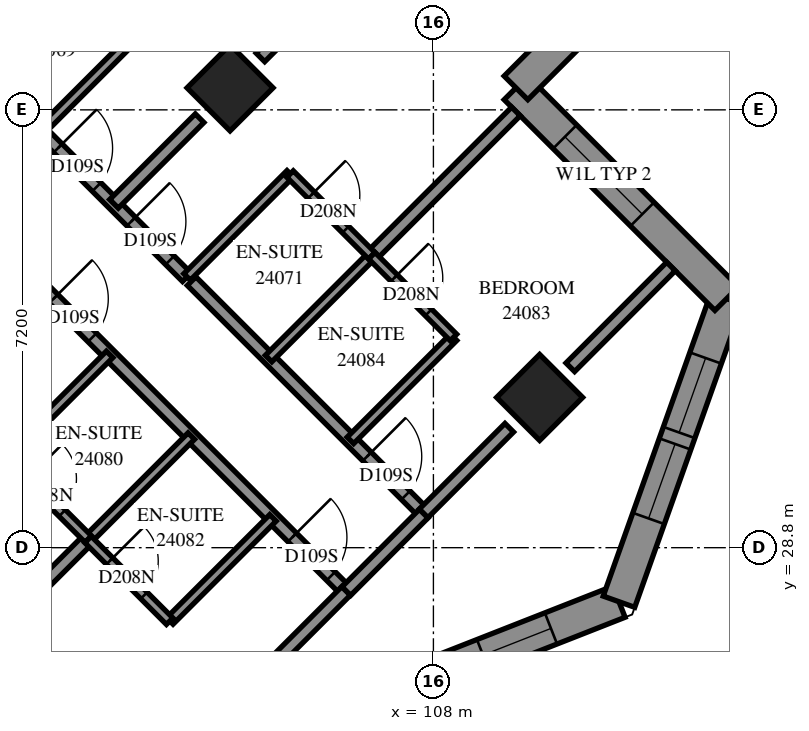
"""IFC4 building model, lengths in metres.
Left out: names, types, materials, properties, quantities, classifications, styles, units other than length and angle.
Written with IfcOpenShell. Run it as: python <this file> out.ifc"""

import sys

from ifc_helpers import new_model, si_unit, direction, frame, frame_2d, origin, origin_2d, place, context, subcontext, project, spatial, polyline, rectangle, outline, extrude, element, fill, save


model = new_model("IFC4")
c1 = context("Model", 3, precision=1e-05, world=origin(), true_north=direction((0.0, 1.0)))
c2 = subcontext(c1, "Body", "Model", "MODEL_VIEW")
j1 = project(units=[si_unit("LENGTHUNIT", "METRE"), si_unit("PLANEANGLEUNIT", "RADIAN")], contexts=[c1])
p1 = place(None, origin())
s1 = spatial("IfcSite", under=j1, at=p1, CompositionType="ELEMENT")
p2 = place(p1, origin())
s2 = spatial("IfcBuilding", under=s1, at=p2, CompositionType="ELEMENT")
p3 = place(p2, frame((0.0, 0.0, 91.4)))
s3 = spatial("IfcBuildingStorey", under=s2, at=p3, CompositionType="ELEMENT", Elevation=91.4)
for number, where, z_axis, x_axis in (
    (1, (104.656, 36.362, 0.0), (0.0, 0.0, 1.0), (0.707, -0.707, 0.0)),
    (2, (109.747, 31.271, 0.0), (0.0, 0.0, 1.0), (0.707, -0.707, 0.0)),
):
    element("IfcColumn", number, at=place(p3, frame(where, z_axis=z_axis, x_axis=x_axis)), inside=s3, PredefinedType="COLUMN", context=c2, shape_type="SweptSolid", body=[
        extrude(rectangle(XDim=1.0, YDim=1.0, at=origin_2d()), origin(), (0.0, 0.0, 1.0), 3.1),
    ])
p4 = place(p3, frame((105.932, 25.9, 0.0), z_axis=(0.0, 0.0, 1.0), x_axis=(0.9307322689, 0.3657013038, 0.0)))
e3 = element("IfcWall", 3, at=p4, inside=s3, PredefinedType="SOLIDWALL", context=c2, shape_type="SweptSolid", body=[
    extrude(outline(polyline([(0.12, -0.275), (5.626, -0.275), (5.376, 0.275), (-0.12, 0.275), (0.12, -0.275)])), origin(), (0.0, 0.0, 1.0), 3.1),
])
p5 = place(p4, frame((0.611, 0.0, 0.5)))
e4 = element("IfcOpeningElement", 4, at=p5, cuts=e3, PredefinedType="OPENING", context=c2, shape_type="SweptSolid", body=[
    extrude(rectangle(XDim=1.2, YDim=2.45, at=frame_2d((0.6, 1.225))), frame((0.0, 0.285, 0.0), z_axis=(0.0, -1.0, 0.0), x_axis=(1.0, 0.0, 0.0)), (0.0, 0.0, 1.0), 0.57),
])
p6 = place(p4, frame((3.099, 0.0, 0.5)))
e5 = element("IfcOpeningElement", 5, at=p6, cuts=e3, PredefinedType="OPENING", context=c2, shape_type="SweptSolid", body=[
    extrude(rectangle(XDim=1.2, YDim=2.45, at=frame_2d((0.6, 1.225))), frame((0.0, 0.285, 0.0), z_axis=(0.0, -1.0, 0.0), x_axis=(1.0, 0.0, 0.0)), (0.0, 0.0, 1.0), 0.57),
])
p7 = place(p3, frame((111.052, 27.912, 0.0), z_axis=(0.0, 0.0, 1.0), x_axis=(0.334975732, 0.9422267556, 0.0)))
e6 = element("IfcWall", 6, at=p7, inside=s3, PredefinedType="SOLIDWALL", context=c2, shape_type="SweptSolid", body=[
    extrude(outline(polyline([(-0.125, -0.275), (5.464, -0.275), (5.117, 0.275), (0.125, 0.275), (-0.125, -0.275)])), origin(), (0.0, 0.0, 1.0), 3.1),
])
p8 = place(p7, frame((1.453, 0.0, 0.5)))
e7 = element("IfcOpeningElement", 7, at=p8, cuts=e6, PredefinedType="OPENING", context=c2, shape_type="SweptSolid", body=[
    extrude(rectangle(XDim=1.3, YDim=2.45, at=frame_2d((0.65, 1.225))), frame((0.0, 0.285, 0.0), z_axis=(0.0, -1.0, 0.0), x_axis=(1.0, 0.0, 0.0)), (0.0, 0.0, 1.0), 0.57),
])
p9 = place(p7, frame((2.953, 0.0, 0.5)))
e8 = element("IfcOpeningElement", 8, at=p9, cuts=e6, PredefinedType="OPENING", context=c2, shape_type="SweptSolid", body=[
    extrude(rectangle(XDim=1.3, YDim=2.45, at=frame_2d((0.65, 1.225))), frame((0.0, 0.285, 0.0), z_axis=(0.0, -1.0, 0.0), x_axis=(1.0, 0.0, 0.0)), (0.0, 0.0, 1.0), 0.57),
])
p10 = place(p3, frame((112.824, 32.896, 0.0), z_axis=(0.0, 0.0, 1.0), x_axis=(-0.7071067812, 0.7071067812, 0.0)))
e9 = element("IfcWall", 9, at=p10, inside=s3, PredefinedType="SOLIDWALL", context=c2, shape_type="SweptSolid", body=[
    extrude(outline(polyline([(-0.174, -0.275), (4.626, -0.275), (5.176, 0.275), (0.174, 0.275), (-0.174, -0.275)])), origin(), (0.0, 0.0, 1.0), 3.1),
])
p11 = place(p10, frame((1.964, 0.0, 0.6)))
e10 = element("IfcOpeningElement", 10, at=p11, cuts=e9, PredefinedType="OPENING", context=c2, shape_type="SweptSolid", body=[
    extrude(rectangle(XDim=1.8, YDim=1.9, at=frame_2d((0.9, 0.95))), frame((0.0, 0.285, 0.0), z_axis=(0.0, -1.0, 0.0), x_axis=(1.0, 0.0, 0.0)), (0.0, 0.0, 1.0), 0.57),
])
p12 = place(p3, frame((109.358, 36.362, 0.0), z_axis=(0.0, 0.0, 1.0), x_axis=(0.7071067812, 0.7071067812, 0.0)))
e11 = element("IfcWall", 11, at=p12, inside=s3, PredefinedType="SOLIDWALL", context=c2, shape_type="SweptSolid", body=[
    extrude(outline(polyline([(0.275, -0.275), (6.066, -0.275), (5.333, 0.275), (-0.275, 0.275), (0.275, -0.275)])), origin(), (0.0, 0.0, 1.0), 3.1),
])
p13 = place(p12, frame((1.137, 0.0, 0.6)))
e12 = element("IfcOpeningElement", 12, at=p13, cuts=e11, PredefinedType="OPENING", context=c2, shape_type="SweptSolid", body=[
    extrude(rectangle(XDim=1.8, YDim=1.9, at=frame_2d((0.9, 0.95))), frame((0.0, 0.285, 0.0), z_axis=(0.0, -1.0, 0.0), x_axis=(1.0, 0.0, 0.0)), (0.0, 0.0, 1.0), 0.57),
])
p14 = place(p3, frame((93.339, 41.309, 0.0), z_axis=(0.0, 0.0, 1.0), x_axis=(0.7071067812, -0.7071067812, 0.0)))
e13 = element("IfcWall", 13, at=p14, inside=s3, PredefinedType="PARTITIONING", context=c2, shape_type="SweptSolid", body=[
    extrude(rectangle(XDim=18.702, YDim=0.2, at=frame_2d((9.351, 0.0))), origin(), (0.0, 0.0, 1.0), 3.1),
])
p15 = place(p14, frame((3.05, 0.0, 0.0)))
e14 = element("IfcOpeningElement", 14, at=p15, cuts=e13, PredefinedType="OPENING", context=c2, shape_type="SweptSolid", body=[
    extrude(rectangle(XDim=0.9, YDim=2.1, at=frame_2d((0.45, 1.05))), frame((0.0, 0.11, 0.0), z_axis=(0.0, -1.0, 0.0), x_axis=(1.0, 0.0, 0.0)), (0.0, 0.0, 1.0), 0.22),
])
p16 = place(p14, frame((4.7, 0.0, 0.0)))
e15 = element("IfcOpeningElement", 15, at=p16, cuts=e13, PredefinedType="OPENING", context=c2, shape_type="SweptSolid", body=[
    extrude(rectangle(XDim=0.9, YDim=2.1, at=frame_2d((0.45, 1.05))), frame((0.0, 0.11, 0.0), z_axis=(0.0, -1.0, 0.0), x_axis=(1.0, 0.0, 0.0)), (0.0, 0.0, 1.0), 0.22),
])
p17 = place(p14, frame((10.149, 0.0, 0.0)))
e16 = element("IfcOpeningElement", 16, at=p17, cuts=e13, PredefinedType="OPENING", context=c2, shape_type="SweptSolid", body=[
    extrude(rectangle(XDim=0.9, YDim=2.1, at=frame_2d((0.45, 1.05))), frame((0.0, 0.11, 0.0), z_axis=(0.0, -1.0, 0.0), x_axis=(1.0, 0.0, 0.0)), (0.0, 0.0, 1.0), 0.22),
])
p18 = place(p14, frame((11.9, 0.0, 0.0)))
e17 = element("IfcOpeningElement", 17, at=p18, cuts=e13, PredefinedType="OPENING", context=c2, shape_type="SweptSolid", body=[
    extrude(rectangle(XDim=0.9, YDim=2.1, at=frame_2d((0.45, 1.05))), frame((0.0, 0.11, 0.0), z_axis=(0.0, -1.0, 0.0), x_axis=(1.0, 0.0, 0.0)), (0.0, 0.0, 1.0), 0.22),
])
p19 = place(p14, frame((17.45, 0.0, 0.0)))
e18 = element("IfcOpeningElement", 18, at=p19, cuts=e13, PredefinedType="OPENING", context=c2, shape_type="SweptSolid", body=[
    extrude(rectangle(XDim=0.9, YDim=2.1, at=frame_2d((0.45, 1.05))), frame((0.0, 0.11, 0.0), z_axis=(0.0, -1.0, 0.0), x_axis=(1.0, 0.0, 0.0)), (0.0, 0.0, 1.0), 0.22),
])
p20 = place(p3, frame((96.501, 23.117, 0.0), z_axis=(0.0, 0.0, 1.0), x_axis=(0.7071128537, 0.7071007086, 0.0)))
e19 = element("IfcWall", 19, at=p20, inside=s3, PredefinedType="PARTITIONING", context=c2, shape_type="SweptSolid", body=[
    extrude(rectangle(XDim=8.234, YDim=0.2, at=frame_2d((4.117, 0.0))), origin(), (0.0, 0.0, 1.0), 3.1),
])
p21 = place(p3, frame((105.155, 36.863, 0.0), z_axis=(0.0, 0.0, 1.0), x_axis=(0.7071067812, 0.7071067812, 0.0)))
e20 = element("IfcWall", 20, at=p21, inside=s3, PredefinedType="PARTITIONING", context=c2, shape_type="SweptSolid", body=[
    extrude(rectangle(XDim=5.787, YDim=0.2, at=frame_2d((2.893, 0.0))), origin(), (0.0, 0.0, 1.0), 3.1),
])
p22 = place(p3, frame((104.023, 33.184, 0.0), z_axis=(0.0, 0.0, 1.0), x_axis=(0.7071067812, -0.7071067812, 0.0)))
e21 = element("IfcWall", 21, at=p22, inside=s3, PredefinedType="PARTITIONING", context=c2, shape_type="SweptSolid", body=[
    extrude(rectangle(XDim=5.399, YDim=0.2, at=frame_2d((2.7, 0.0))), origin(), (0.0, 0.0, 1.0), 3.1),
])
p23 = place(p22, frame((4.08, 0.0, 0.0)))
e22 = element("IfcOpeningElement", 22, at=p23, cuts=e21, PredefinedType="OPENING", context=c2, shape_type="SweptSolid", body=[
    extrude(rectangle(XDim=0.9, YDim=2.1, at=frame_2d((0.45, 1.05))), frame((0.0, 0.11, 0.0), z_axis=(0.0, -1.0, 0.0), x_axis=(1.0, 0.0, 0.0)), (0.0, 0.0, 1.0), 0.22),
])
p24 = place(p3, frame((101.541, 35.651, 0.0), z_axis=(0.0, 0.0, 1.0), x_axis=(0.7071067812, -0.7071067812, 0.0)))
e23 = element("IfcWall", 23, at=p24, inside=s3, PredefinedType="PARTITIONING", context=c2, shape_type="SweptSolid", body=[
    extrude(rectangle(XDim=3.4, YDim=0.2, at=frame_2d((1.7, 0.0))), origin(), (0.0, 0.0, 1.0), 3.1),
])
p25 = place(p24, frame((0.4, 0.0, 0.0)))
e24 = element("IfcOpeningElement", 24, at=p25, cuts=e23, PredefinedType="OPENING", context=c2, shape_type="SweptSolid", body=[
    extrude(rectangle(XDim=0.9, YDim=2.1, at=frame_2d((0.45, 1.05))), frame((0.0, 0.11, 0.0), z_axis=(0.0, -1.0, 0.0), x_axis=(1.0, 0.0, 0.0)), (0.0, 0.0, 1.0), 0.22),
])
p26 = place(p24, frame((2.105, 0.0, 0.0)))
e25 = element("IfcOpeningElement", 25, at=p26, cuts=e23, PredefinedType="OPENING", context=c2, shape_type="SweptSolid", body=[
    extrude(rectangle(XDim=0.9, YDim=2.1, at=frame_2d((0.45, 1.05))), frame((0.0, 0.11, 0.0), z_axis=(0.0, -1.0, 0.0), x_axis=(1.0, 0.0, 0.0)), (0.0, 0.0, 1.0), 0.22),
])
p27 = place(p3, frame((106.989, 33.605, 0.0), z_axis=(0.0, 0.0, 1.0), x_axis=(0.7071067812, 0.7071067812, 0.0)))
e26 = element("IfcWall", 26, at=p27, inside=s3, PredefinedType="PARTITIONING", context=c2, shape_type="SweptSolid", body=[
    extrude(rectangle(XDim=3.35, YDim=0.2, at=frame_2d((1.675, 0.0))), origin(), (0.0, 0.0, 1.0), 3.1),
])
p28 = place(p3, frame((100.977, 30.281, 0.0), z_axis=(0.0, 0.0, 1.0), x_axis=(0.7071067812, 0.7071067812, 0.0)))
e27 = element("IfcWall", 27, at=p28, inside=s3, PredefinedType="PARTITIONING", context=c2, shape_type="SweptSolid", body=[
    extrude(rectangle(XDim=2.401, YDim=0.15, at=frame_2d((1.201, 0.0))), origin(), (0.0, 0.0, 1.0), 3.1),
])
for number, where, z_axis, x_axis in (
    (28, (100.203, 36.997, 0.0), (0.0, 0.0, 1.0), (0.707, 0.708, 0.0)),
    (29, (105.29, 31.91, 0.0), (0.0, 0.0, 1.0), (0.708, 0.707, 0.0)),
):
    element("IfcWall", number, at=place(p3, frame(where, z_axis=z_axis, x_axis=x_axis)), inside=s3, PredefinedType="PARTITIONING", context=c2, shape_type="SweptSolid", body=[
        extrude(rectangle(XDim=2.4, YDim=0.15, at=frame_2d((1.2, 0.0))), origin(), (0.0, 0.0, 1.0), 3.1),
    ])
for number, where, z_axis, x_axis in (
    (30, (101.545, 35.657, 0.0), (0.0, 0.0, 1.0), (0.707, 0.707, 0.0)),
    (31, (102.323, 28.939, 0.0), (0.0, 0.0, 1.0), (0.707, 0.707, 0.0)),
    (32, (103.665, 27.595, 0.0), (0.0, 0.0, 1.0), (0.707, 0.707, 0.0)),
    (33, (106.635, 30.565, 0.0), (0.0, 0.0, 1.0), (0.707, 0.707, 0.0)),
    (34, (103.949, 33.253, 0.0), (0.0, 0.0, 1.0), (0.707, 0.707, 0.0)),
):
    element("IfcWall", number, at=place(p3, frame(where, z_axis=z_axis, x_axis=x_axis)), inside=s3, PredefinedType="PARTITIONING", context=c2, shape_type="SweptSolid", body=[
        extrude(rectangle(XDim=2.398, YDim=0.15, at=frame_2d((1.199, 0.0))), origin(), (0.0, 0.0, 1.0), 3.1),
    ])
p29 = place(p3, frame((110.251, 31.767, 0.0), z_axis=(0.0, 0.0, 1.0), x_axis=(0.7066584143, 0.7075548639, 0.0)))
e35 = element("IfcWall", 35, at=p29, inside=s3, PredefinedType="PARTITIONING", context=c2, shape_type="SweptSolid", body=[
    extrude(rectangle(XDim=2.343, YDim=0.2, at=frame_2d((1.171, 0.0))), origin(), (0.0, 0.0, 1.0), 3.1),
])
for number, where, z_axis, x_axis in (
    (36, (107.837, 29.363, 0.0), (0.0, 0.0, 1.0), (0.707, 0.707, 0.0)),
    (37, (105.154, 26.68, 0.0), (0.0, 0.0, 1.0), (0.707, 0.707, 0.0)),
):
    element("IfcWall", number, at=place(p3, frame(where, z_axis=z_axis, x_axis=x_axis)), inside=s3, PredefinedType="PARTITIONING", context=c2, shape_type="SweptSolid", body=[
        extrude(rectangle(XDim=1.994, YDim=0.2, at=frame_2d((0.997, 0.0))), origin(), (0.0, 0.0, 1.0), 2.6),
    ])
p30 = place(p3, frame((102.747, 34.455, 0.0), z_axis=(0.0, 0.0, 1.0), x_axis=(0.7071067812, 0.7071067812, 0.0)))
e38 = element("IfcWall", 38, at=p30, inside=s3, PredefinedType="PARTITIONING", context=c2, shape_type="SweptSolid", body=[
    extrude(rectangle(XDim=1.991, YDim=0.2, at=frame_2d((0.996, 0.0))), origin(), (0.0, 0.0, 1.0), 3.1),
])
p31 = place(p3, frame((105.642, 34.944, 0.0), z_axis=(0.0, 0.0, 1.0), x_axis=(0.7071067812, -0.7071067812, 0.0)))
e39 = element("IfcWall", 39, at=p31, inside=s3, PredefinedType="PARTITIONING", context=c2, shape_type="SweptSolid", body=[
    extrude(rectangle(XDim=1.901, YDim=0.15, at=frame_2d((0.95, 0.0))), origin(), (0.0, 0.0, 1.0), 3.1),
])
p32 = place(p31, frame((0.491, 0.0, 0.0)))
e40 = element("IfcOpeningElement", 40, at=p32, cuts=e39, PredefinedType="OPENING", context=c2, shape_type="SweptSolid", body=[
    extrude(rectangle(XDim=0.8, YDim=2.1, at=frame_2d((0.4, 1.05))), frame((0.0, 0.085, 0.0), z_axis=(0.0, -1.0, 0.0), x_axis=(1.0, 0.0, 0.0)), (0.0, 0.0, 1.0), 0.17),
])
p33 = place(p3, frame((100.981, 30.283, 0.0), z_axis=(0.0, 0.0, 1.0), x_axis=(0.7076330979, -0.7065800724, 0.0)))
e41 = element("IfcWall", 41, at=p33, inside=s3, PredefinedType="PARTITIONING", context=c2, shape_type="SweptSolid", body=[
    extrude(rectangle(XDim=1.899, YDim=0.15, at=frame_2d((0.95, 0.0))), origin(), (0.0, 0.0, 1.0), 3.1),
])
p34 = place(p33, frame((0.493, 0.0, 0.0)))
e42 = element("IfcOpeningElement", 42, at=p34, cuts=e41, PredefinedType="OPENING", context=c2, shape_type="SweptSolid", body=[
    extrude(rectangle(XDim=0.8, YDim=2.1, at=frame_2d((0.4, 1.05))), frame((0.0, 0.085, 0.0), z_axis=(0.0, -1.0, 0.0), x_axis=(1.0, 0.0, 0.0)), (0.0, 0.0, 1.0), 0.17),
])
p35 = place(p3, frame((102.321, 28.935, 0.0), z_axis=(0.0, 0.0, 1.0), x_axis=(0.7065800724, -0.7076330979, 0.0)))
e43 = element("IfcWall", 43, at=p35, inside=s3, PredefinedType="PARTITIONING", context=c2, shape_type="SweptSolid", body=[
    extrude(rectangle(XDim=1.899, YDim=0.15, at=frame_2d((0.95, 0.0))), origin(), (0.0, 0.0, 1.0), 3.1),
])
p36 = place(p35, frame((0.501, 0.0, 0.0)))
e44 = element("IfcOpeningElement", 44, at=p36, cuts=e43, PredefinedType="OPENING", context=c2, shape_type="SweptSolid", body=[
    extrude(rectangle(XDim=0.8, YDim=2.1, at=frame_2d((0.4, 1.05))), frame((0.0, 0.085, 0.0), z_axis=(0.0, -1.0, 0.0), x_axis=(1.0, 0.0, 0.0)), (0.0, 0.0, 1.0), 0.17),
])
p37 = place(p3, frame((106.987, 33.602, 0.0), z_axis=(0.0, 0.0, 1.0), x_axis=(0.7065800724, -0.7076330979, 0.0)))
e45 = element("IfcWall", 45, at=p37, inside=s3, PredefinedType="PARTITIONING", context=c2, shape_type="SweptSolid", body=[
    extrude(rectangle(XDim=1.899, YDim=0.15, at=frame_2d((0.95, 0.0))), origin(), (0.0, 0.0, 1.0), 3.1),
])
p38 = place(p37, frame((0.519, 0.0, 0.0)))
e46 = element("IfcOpeningElement", 46, at=p38, cuts=e45, PredefinedType="OPENING", context=c2, shape_type="SweptSolid", body=[
    extrude(rectangle(XDim=0.8, YDim=2.1, at=frame_2d((0.4, 1.05))), frame((0.0, 0.085, 0.0), z_axis=(0.0, -1.0, 0.0), x_axis=(1.0, 0.0, 0.0)), (0.0, 0.0, 1.0), 0.17),
])
p39 = place(p3, frame((106.568, 28.086, 0.0), z_axis=(0.0, 0.0, 1.0), x_axis=(0.7065510983, 0.7076620277, 0.0)))
e47 = element("IfcWall", 47, at=p39, inside=s3, PredefinedType="PARTITIONING", context=c2, shape_type="SweptSolid", body=[
    extrude(rectangle(XDim=1.8, YDim=0.2, at=frame_2d((0.9, 0.0))), origin(), (0.0, 0.0, 1.0), 2.6),
])
p40 = place(p6, origin())
e48 = element("IfcWindow", 48, at=p40, inside=s3, PartitioningType="SINGLE_PANEL", PredefinedType="WINDOW", context=c2, shape_type="SweptSolid", body=[
    extrude(rectangle(XDim=1.2, YDim=2.45, at=frame_2d((0.6, 1.225))), frame((0.0, 0.155, 0.0), z_axis=(0.0, -1.0, 0.0), x_axis=(1.0, 0.0, 0.0)), (0.0, 0.0, 1.0), 0.06),
])
fill(e5, e48)
p41 = place(p8, origin())
e49 = element("IfcWindow", 49, at=p41, inside=s3, PartitioningType="SINGLE_PANEL", PredefinedType="WINDOW", context=c2, shape_type="SweptSolid", body=[
    extrude(rectangle(XDim=1.3, YDim=2.45, at=frame_2d((0.65, 1.225))), frame((0.0, 0.155, 0.0), z_axis=(0.0, -1.0, 0.0), x_axis=(1.0, 0.0, 0.0)), (0.0, 0.0, 1.0), 0.06),
])
fill(e7, e49)
p42 = place(p9, origin())
e50 = element("IfcWindow", 50, at=p42, inside=s3, PartitioningType="SINGLE_PANEL", PredefinedType="WINDOW", context=c2, shape_type="SweptSolid", body=[
    extrude(rectangle(XDim=1.3, YDim=2.45, at=frame_2d((0.65, 1.225))), frame((0.0, 0.155, 0.0), z_axis=(0.0, -1.0, 0.0), x_axis=(1.0, 0.0, 0.0)), (0.0, 0.0, 1.0), 0.06),
])
fill(e8, e50)
p43 = place(p11, origin())
e51 = element("IfcWindow", 51, at=p43, inside=s3, PartitioningType="SINGLE_PANEL", PredefinedType="WINDOW", context=c2, shape_type="SweptSolid", body=[
    extrude(rectangle(XDim=1.8, YDim=1.9, at=frame_2d((0.9, 0.95))), frame((0.0, 0.155, 0.0), z_axis=(0.0, -1.0, 0.0), x_axis=(1.0, 0.0, 0.0)), (0.0, 0.0, 1.0), 0.06),
])
fill(e10, e51)
p44 = place(p25, origin())
e52 = element("IfcDoor", 52, at=p44, inside=s3, OperationType="SINGLE_SWING_RIGHT", PredefinedType="DOOR", context=c2, shape_type="SweptSolid", body=[
    extrude(rectangle(XDim=0.9, YDim=2.1, at=frame_2d((0.45, 1.05))), frame((0.0, 0.025, 0.0), z_axis=(0.0, -1.0, 0.0), x_axis=(1.0, 0.0, 0.0)), (0.0, 0.0, 1.0), 0.05),
])
fill(e24, e52)
p45 = place(p26, origin())
e53 = element("IfcDoor", 53, at=p45, inside=s3, OperationType="SINGLE_SWING_LEFT", PredefinedType="DOOR", context=c2, shape_type="SweptSolid", body=[
    extrude(rectangle(XDim=0.9, YDim=2.1, at=frame_2d((0.45, 1.05))), frame((0.0, 0.025, 0.0), z_axis=(0.0, -1.0, 0.0), x_axis=(1.0, 0.0, 0.0)), (0.0, 0.0, 1.0), 0.05),
])
fill(e25, e53)
p46 = place(p32, origin())
e54 = element("IfcDoor", 54, at=p46, inside=s3, OperationType="SINGLE_SWING_RIGHT", PredefinedType="DOOR", context=c2, shape_type="SweptSolid", body=[
    extrude(rectangle(XDim=0.8, YDim=2.1, at=frame_2d((0.4, 1.05))), frame((0.0, 0.025, 0.0), z_axis=(0.0, -1.0, 0.0), x_axis=(1.0, 0.0, 0.0)), (0.0, 0.0, 1.0), 0.05),
])
fill(e40, e54)
p47 = place(p18, origin())
e55 = element("IfcDoor", 55, at=p47, inside=s3, OperationType="SINGLE_SWING_RIGHT", PredefinedType="DOOR", context=c2, shape_type="SweptSolid", body=[
    extrude(rectangle(XDim=0.9, YDim=2.1, at=frame_2d((0.45, 1.05))), frame((0.0, 0.025, 0.0), z_axis=(0.0, -1.0, 0.0), x_axis=(1.0, 0.0, 0.0)), (0.0, 0.0, 1.0), 0.05),
])
fill(e17, e55)
p48 = place(p34, origin())
e56 = element("IfcDoor", 56, at=p48, inside=s3, OperationType="SINGLE_SWING_RIGHT", PredefinedType="DOOR", context=c2, shape_type="SweptSolid", body=[
    extrude(rectangle(XDim=0.8, YDim=2.1, at=frame_2d((0.4, 1.05))), frame((0.0, 0.025, 0.0), z_axis=(0.0, -1.0, 0.0), x_axis=(1.0, 0.0, 0.0)), (0.0, 0.0, 1.0), 0.05),
])
fill(e42, e56)
p49 = place(p19, origin())
e57 = element("IfcDoor", 57, at=p49, inside=s3, OperationType="SINGLE_SWING_LEFT", PredefinedType="DOOR", context=c2, shape_type="SweptSolid", body=[
    extrude(rectangle(XDim=0.9, YDim=2.1, at=frame_2d((0.45, 1.05))), frame((0.0, 0.025, 0.0), z_axis=(0.0, -1.0, 0.0), x_axis=(1.0, 0.0, 0.0)), (0.0, 0.0, 1.0), 0.05),
])
fill(e18, e57)
p50 = place(p36, origin())
e58 = element("IfcDoor", 58, at=p50, inside=s3, OperationType="SINGLE_SWING_RIGHT", PredefinedType="DOOR", context=c2, shape_type="SweptSolid", body=[
    extrude(rectangle(XDim=0.8, YDim=2.1, at=frame_2d((0.4, 1.05))), frame((0.0, 0.025, 0.0), z_axis=(0.0, -1.0, 0.0), x_axis=(1.0, 0.0, 0.0)), (0.0, 0.0, 1.0), 0.05),
])
fill(e44, e58)
p51 = place(p23, origin())
e59 = element("IfcDoor", 59, at=p51, inside=s3, OperationType="SINGLE_SWING_RIGHT", PredefinedType="DOOR", context=c2, shape_type="SweptSolid", body=[
    extrude(rectangle(XDim=0.9, YDim=2.1, at=frame_2d((0.45, 1.05))), frame((0.0, 0.025, 0.0), z_axis=(0.0, -1.0, 0.0), x_axis=(1.0, 0.0, 0.0)), (0.0, 0.0, 1.0), 0.05),
])
fill(e22, e59)
p52 = place(p38, origin())
e60 = element("IfcDoor", 60, at=p52, inside=s3, OperationType="SINGLE_SWING_RIGHT", PredefinedType="DOOR", context=c2, shape_type="SweptSolid", body=[
    extrude(rectangle(XDim=0.8, YDim=2.1, at=frame_2d((0.4, 1.05))), frame((0.0, 0.025, 0.0), z_axis=(0.0, -1.0, 0.0), x_axis=(1.0, 0.0, 0.0)), (0.0, 0.0, 1.0), 0.05),
])
fill(e46, e60)
save(model, sys.argv[1])
